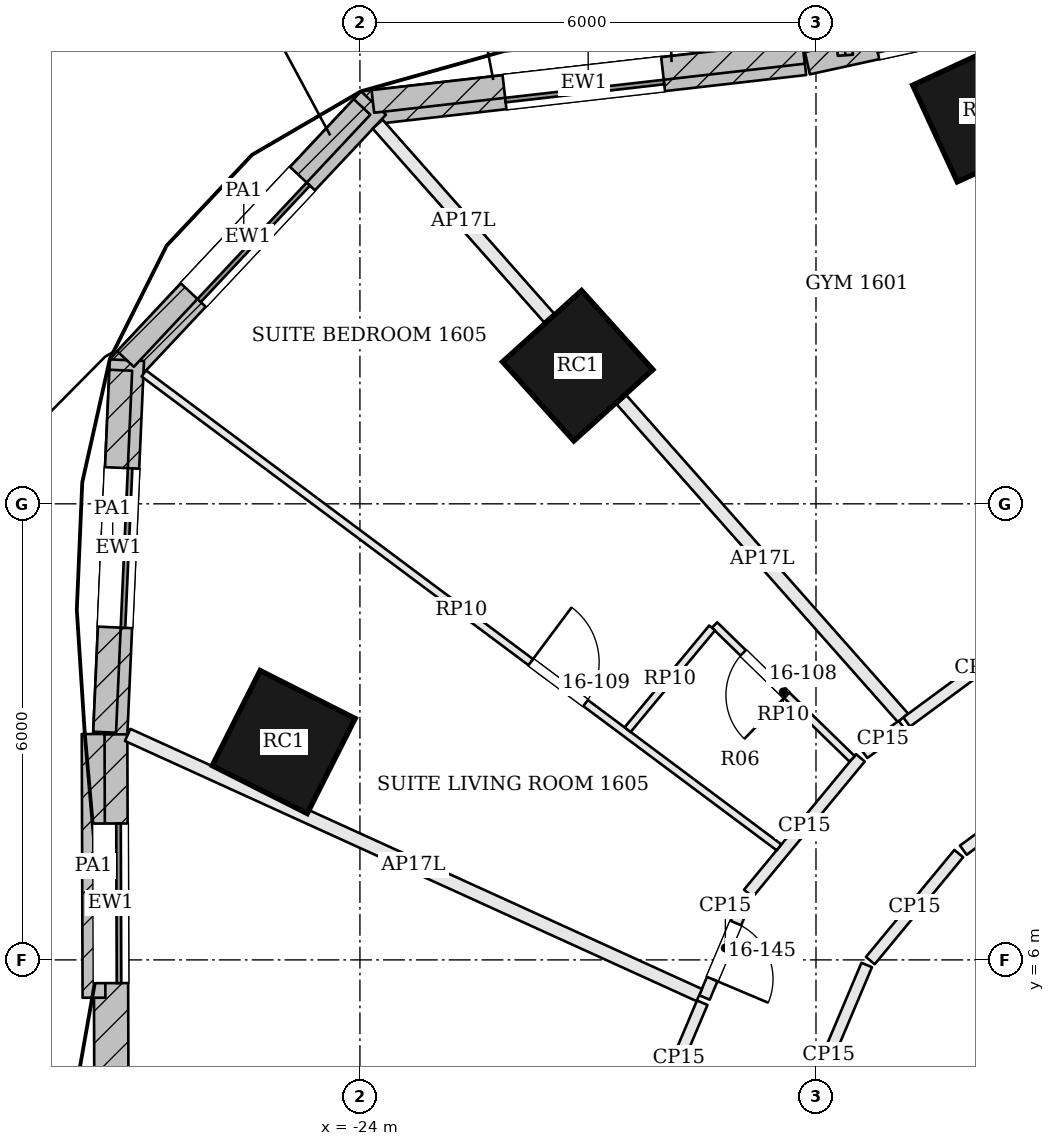
"""IFC4 building model, lengths in metres.
Left out: names, types, materials, properties, quantities, classifications, styles, units other than length and angle.
Written with IfcOpenShell. Run it as: python <this file> out.ifc"""

import sys

from ifc_helpers import new_model, si_unit, direction, frame, frame_2d, origin, origin_2d, place, context, subcontext, project, spatial, rectangle, extrude, element, fill, save


model = new_model("IFC4")
c1 = context("Model", 3, precision=1e-05, world=origin(), true_north=direction((0.0, 1.0)))
c2 = subcontext(c1, "Body", "Model", "MODEL_VIEW")
j1 = project(units=[si_unit("LENGTHUNIT", "METRE"), si_unit("PLANEANGLEUNIT", "RADIAN")], contexts=[c1])
p1 = place(None, origin())
s1 = spatial("IfcSite", under=j1, at=p1, CompositionType="ELEMENT")
p2 = place(p1, origin())
s2 = spatial("IfcBuilding", under=s1, at=p2, CompositionType="ELEMENT")
p3 = place(p2, frame((0.0, 0.0, 73.5)))
s3 = spatial("IfcBuildingStorey", under=s2, at=p3, CompositionType="ELEMENT", Elevation=73.5)
for number, where, z_axis, x_axis in (
    (1, (-15.799, 17.165, 0.0), (0.0, 0.0, 1.0), (-0.908, -0.419, 0.0)),
    (2, (-21.135, 13.817, 0.0), (0.0, 0.0, 1.0), (-0.743, -0.67, 0.0)),
    (3, (-25.003, 8.866, 0.0), (0.0, 0.0, 1.0), (-0.45, -0.893, 0.0)),
):
    element("IfcColumn", number, at=place(p3, frame(where, z_axis=z_axis, x_axis=x_axis)), inside=s3, PredefinedType="COLUMN", context=c2, shape_type="SweptSolid", body=[
        extrude(rectangle(XDim=1.4, YDim=1.4, at=origin_2d()), origin(), (0.0, 0.0, 1.0), 2.8),
    ])
p4 = place(p3, frame((-14.251, 18.718, 0.0), z_axis=(0.0, 0.0, 1.0), x_axis=(-0.976903627618, -0.213680374267, 0.0)))
e4 = element("IfcWall", 4, at=p4, inside=s3, PredefinedType="SOLIDWALL", context=c2, shape_type="SweptSolid", body=[
    extrude(rectangle(XDim=3.97, YDim=0.45, at=frame_2d((1.985, 0.0))), origin(), (0.0, 0.0, 1.0), 3.3),
])
p5 = place(p4, frame((0.935, 0.0, 0.9)))
e5 = element("IfcOpeningElement", 5, at=p5, cuts=e4, PredefinedType="OPENING", context=c2, shape_type="SweptSolid", body=[
    extrude(rectangle(XDim=2.1, YDim=1.8, at=frame_2d((1.05, 0.9))), frame((0.0, 0.235, 0.0), z_axis=(0.0, -1.0, 0.0), x_axis=(1.0, 0.0, 0.0)), (0.0, 0.0, 1.0), 0.47),
])
p6 = place(p3, frame((-18.154, 17.865, 0.0), z_axis=(0.0, 0.0, 1.0), x_axis=(-0.993572909097, -0.113193967633, 0.0)))
e6 = element("IfcWall", 6, at=p6, inside=s3, PredefinedType="SOLIDWALL", context=c2, shape_type="SweptSolid", body=[
    extrude(rectangle(XDim=5.839, YDim=0.45, at=frame_2d((2.919, 0.0))), origin(), (0.0, 0.0, 1.0), 3.3),
])
p7 = place(p6, frame((1.869, 0.0, 0.9)))
e7 = element("IfcOpeningElement", 7, at=p7, cuts=e6, PredefinedType="OPENING", context=c2, shape_type="SweptSolid", body=[
    extrude(rectangle(XDim=2.1, YDim=1.8, at=frame_2d((1.05, 0.9))), frame((0.0, 0.235, 0.0), z_axis=(0.0, -1.0, 0.0), x_axis=(1.0, 0.0, 0.0)), (0.0, 0.0, 1.0), 0.47),
])
p8 = place(p3, frame((-23.822, 17.273, 0.0), z_axis=(0.0, 0.0, 1.0), x_axis=(-0.684173167988, -0.729319598122, 0.0)))
e8 = element("IfcWall", 8, at=p8, inside=s3, PredefinedType="SOLIDWALL", context=c2, shape_type="SweptSolid", body=[
    extrude(rectangle(XDim=4.829, YDim=0.45, at=frame_2d((2.415, 0.0))), origin(), (0.0, 0.0, 1.0), 3.3),
])
p9 = place(p8, frame((1.365, 0.0, 0.9)))
e9 = element("IfcOpeningElement", 9, at=p9, cuts=e8, PredefinedType="OPENING", context=c2, shape_type="SweptSolid", body=[
    extrude(rectangle(XDim=2.1, YDim=1.8, at=frame_2d((1.05, 0.9))), frame((0.0, 0.235, 0.0), z_axis=(0.0, -1.0, 0.0), x_axis=(1.0, 0.0, 0.0)), (0.0, 0.0, 1.0), 0.47),
])
p10 = place(p3, frame((-27.065, 13.89, 0.0), z_axis=(0.0, 0.0, 1.0), x_axis=(-0.044544250924, -0.99900741224, 0.0)))
e10 = element("IfcWall", 10, at=p10, inside=s3, PredefinedType="SOLIDWALL", context=c2, shape_type="SweptSolid", body=[
    extrude(rectangle(XDim=4.938, YDim=0.45, at=frame_2d((2.469, 0.0))), origin(), (0.0, 0.0, 1.0), 3.3),
])
p11 = place(p10, frame((1.419, 0.0, 0.9)))
e11 = element("IfcOpeningElement", 11, at=p11, cuts=e10, PredefinedType="OPENING", context=c2, shape_type="SweptSolid", body=[
    extrude(rectangle(XDim=2.1, YDim=1.8, at=frame_2d((1.05, 0.9))), frame((0.0, 0.235, 0.0), z_axis=(0.0, -1.0, 0.0), x_axis=(1.0, 0.0, 0.0)), (0.0, 0.0, 1.0), 0.47),
])
p12 = place(p3, frame((-27.285, 8.967, 0.0), z_axis=(0.0, 0.0, 1.0), x_axis=(0.003185571797, -0.999994926053, 0.0)))
e12 = element("IfcWall", 12, at=p12, inside=s3, PredefinedType="SOLIDWALL", context=c2, shape_type="SweptSolid", body=[
    extrude(rectangle(XDim=4.445, YDim=0.45, at=frame_2d((2.223, 0.0))), origin(), (0.0, 0.0, 1.0), 3.3),
])
p13 = place(p12, frame((1.173, 0.0, 0.9)))
e13 = element("IfcOpeningElement", 13, at=p13, cuts=e12, PredefinedType="OPENING", context=c2, shape_type="SweptSolid", body=[
    extrude(rectangle(XDim=2.1, YDim=1.8, at=frame_2d((1.05, 0.9))), frame((0.0, 0.235, 0.0), z_axis=(0.0, -1.0, 0.0), x_axis=(1.0, 0.0, 0.0)), (0.0, 0.0, 1.0), 0.47),
])
p14 = place(p3, frame((-17.614, 17.901, 0.0), z_axis=(0.0, 0.0, 1.0), x_axis=(-0.069750000204, 0.997564502913, 0.0)))
e14 = element("IfcWall", 14, at=p14, inside=s3, PredefinedType="SOLIDWALL", context=c2, shape_type="SweptSolid", body=[
    extrude(rectangle(XDim=1.75, YDim=0.2, at=frame_2d((0.875, 0.0))), origin(), (0.0, 0.0, 1.0), 3.3),
])
p15 = place(p3, frame((-18.165, 17.939, 3.6), z_axis=(0.0, 0.0, 1.0), x_axis=(-0.99357552433, -0.113171009774, 0.0)))
e15 = element("IfcWall", 15, at=p15, inside=s3, PredefinedType="PARAPET", context=c2, shape_type="SweptSolid", body=[
    extrude(rectangle(XDim=5.702, YDim=0.3, at=frame_2d((2.851, 0.0))), origin(), (0.0, 0.0, 1.0), 1.1),
])
p16 = place(p3, frame((-23.972, 17.222, 3.6), z_axis=(0.0, 0.0, 1.0), x_axis=(-0.684173231326, -0.729319538705, 0.0)))
e16 = element("IfcWall", 16, at=p16, inside=s3, PredefinedType="PARAPET", context=c2, shape_type="SweptSolid", body=[
    extrude(rectangle(XDim=4.548, YDim=0.3, at=frame_2d((2.274, 0.0))), origin(), (0.0, 0.0, 1.0), 1.1),
])
p17 = place(p3, frame((-27.146, 13.757, 3.6), z_axis=(0.0, 0.0, 1.0), x_axis=(-0.044503972994, -0.999009207359, 0.0)))
e17 = element("IfcWall", 17, at=p17, inside=s3, PredefinedType="PARAPET", context=c2, shape_type="SweptSolid", body=[
    extrude(rectangle(XDim=4.767, YDim=0.3, at=frame_2d((2.384, 0.0))), origin(), (0.0, 0.0, 1.0), 1.1),
])
p18 = place(p3, frame((-27.51, 8.972, 3.6), z_axis=(0.0, 0.0, 1.0), x_axis=(0.003236912182, -0.999994761186, 0.0)))
e18 = element("IfcWall", 18, at=p18, inside=s3, PredefinedType="PARAPET", context=c2, shape_type="SweptSolid", body=[
    extrude(rectangle(XDim=3.469, YDim=0.3, at=frame_2d((1.735, 0.0))), origin(), (0.0, 0.0, 1.0), 1.1),
])
p19 = place(p3, frame((-14.861, 10.563, 0.0), z_axis=(0.0, 0.0, 1.0), x_axis=(-0.805253823387, -0.592930248781, 0.0)))
e19 = element("IfcWall", 19, at=p19, inside=s3, PredefinedType="PARTITIONING", context=c2, shape_type="SweptSolid", body=[
    extrude(rectangle(XDim=2.417, YDim=0.15, at=frame_2d((1.208, 0.0))), origin(), (0.0, 0.0, 1.0), 2.684),
])
p20 = place(p3, frame((-23.767, 16.995, 0.0), z_axis=(0.0, 0.0, 1.0), x_axis=(0.662714726813, -0.748871945572, 0.0)))
e20 = element("IfcWall", 20, at=p20, inside=s3, PredefinedType="PARTITIONING", context=c2, shape_type="SweptSolid", body=[
    extrude(rectangle(XDim=3.403, YDim=0.175, at=frame_2d((1.702, 0.0))), origin(), (0.0, 0.0, 1.0), 2.28),
])
p21 = place(p3, frame((-20.558, 13.368, 0.0), z_axis=(0.0, 0.0, 1.0), x_axis=(0.662734219401, -0.748854695141, 0.0)))
e21 = element("IfcWall", 21, at=p21, inside=s3, PredefinedType="PARTITIONING", context=c2, shape_type="SweptSolid", body=[
    extrude(rectangle(XDim=5.585, YDim=0.175, at=frame_2d((2.792, 0.0))), origin(), (0.0, 0.0, 1.0), 2.28),
])
p22 = place(p3, frame((-16.867, 9.085, 0.0), z_axis=(0.0, 0.0, 1.0), x_axis=(-0.805381102541, -0.592757353113, 0.0)))
e22 = element("IfcWall", 22, at=p22, inside=s3, PredefinedType="PARTITIONING", context=c2, shape_type="SweptSolid", body=[
    extrude(rectangle(XDim=0.622, YDim=0.15, at=frame_2d((0.311, 0.0))), origin(), (0.0, 0.0, 1.0), 2.684),
])
p23 = place(p3, frame((-17.416, 8.659, 0.0), z_axis=(0.0, 0.0, 1.0), x_axis=(-0.636865073139, -0.770975277564, 0.0)))
e23 = element("IfcWall", 23, at=p23, inside=s3, PredefinedType="PARTITIONING", context=c2, shape_type="SweptSolid", body=[
    extrude(rectangle(XDim=2.312, YDim=0.15, at=frame_2d((1.156, 0.0))), origin(), (0.0, 0.0, 1.0), 2.684),
])
p24 = place(p3, frame((-18.918, 6.807, 0.0), z_axis=(0.0, 0.0, 1.0), x_axis=(-0.389115481404, -0.921188982854, 0.0)))
e24 = element("IfcWall", 24, at=p24, inside=s3, PredefinedType="PARTITIONING", context=c2, shape_type="SweptSolid", body=[
    extrude(rectangle(XDim=1.412, YDim=0.15, at=frame_2d((0.706, 0.0))), origin(), (0.0, 0.0, 1.0), 2.684),
])
p25 = place(p24, frame((0.35, 0.0, 0.0)))
e25 = element("IfcOpeningElement", 25, at=p25, cuts=e24, PredefinedType="OPENING", context=c2, shape_type="SweptSolid", body=[
    extrude(rectangle(XDim=0.8, YDim=2.1, at=frame_2d((0.4, 1.05))), frame((0.0, 0.085, 0.0), z_axis=(0.0, -1.0, 0.0), x_axis=(1.0, 0.0, 0.0)), (0.0, 0.0, 1.0), 0.17),
])
p26 = place(p3, frame((-27.056, 8.96, 0.0), z_axis=(0.0, 0.0, 1.0), x_axis=(0.910158921773, -0.414259263164, 0.0)))
e26 = element("IfcWall", 26, at=p26, inside=s3, PredefinedType="PARTITIONING", context=c2, shape_type="SweptSolid", body=[
    extrude(rectangle(XDim=8.263, YDim=0.175, at=frame_2d((4.131, 0.0))), origin(), (0.0, 0.0, 1.0), 2.28),
])
p27 = place(p3, frame((-19.497, 5.437, 0.0), z_axis=(0.0, 0.0, 1.0), x_axis=(-0.389131954688, -0.921182024271, 0.0)))
e27 = element("IfcWall", 27, at=p27, inside=s3, PredefinedType="PARTITIONING", context=c2, shape_type="SweptSolid", body=[
    extrude(rectangle(XDim=1.583, YDim=0.15, at=frame_2d((0.792, 0.0))), origin(), (0.0, 0.0, 1.0), 2.684),
])
p28 = place(p3, frame((-18.33, 3.573, 0.0), z_axis=(0.0, 0.0, 1.0), x_axis=(0.389176861346, 0.921163053207, 0.0)))
e28 = element("IfcWall", 28, at=p28, inside=s3, PredefinedType="PARTITIONING", context=c2, shape_type="SweptSolid", body=[
    extrude(rectangle(XDim=2.563, YDim=0.15, at=frame_2d((1.281, 0.0))), origin(), (0.0, 0.0, 1.0), 2.684),
])
p29 = place(p3, frame((-17.285, 5.991, 0.0), z_axis=(0.0, 0.0, 1.0), x_axis=(0.636877992195, 0.770964605581, 0.0)))
e29 = element("IfcWall", 29, at=p29, inside=s3, PredefinedType="PARTITIONING", context=c2, shape_type="SweptSolid", body=[
    extrude(rectangle(XDim=1.826, YDim=0.15, at=frame_2d((0.913, 0.0))), origin(), (0.0, 0.0, 1.0), 2.684),
])
p30 = place(p3, frame((-16.062, 7.443, 0.0), z_axis=(0.0, 0.0, 1.0), x_axis=(0.805204624788, 0.5929970592, 0.0)))
e30 = element("IfcWall", 30, at=p30, inside=s3, PredefinedType="PARTITIONING", context=c2, shape_type="SweptSolid", body=[
    extrude(rectangle(XDim=1.567, YDim=0.15, at=frame_2d((0.783, 0.0))), origin(), (0.0, 0.0, 1.0), 2.684),
])
p31 = place(p3, frame((-26.844, 13.716, 0.0), z_axis=(0.0, 0.0, 1.0), x_axis=(0.801523054034, -0.597963873367, 0.0)))
e31 = element("IfcWall", 31, at=p31, inside=s3, PredefinedType="PARTITIONING", context=c2, shape_type="SweptSolid", body=[
    extrude(rectangle(XDim=10.427, YDim=0.1, at=frame_2d((5.214, 0.0))), origin(), (0.0, 0.0, 1.0), 2.784),
])
p32 = place(p31, frame((6.352, 0.0, 0.0)))
e32 = element("IfcOpeningElement", 32, at=p32, cuts=e31, PredefinedType="OPENING", context=c2, shape_type="SweptSolid", body=[
    extrude(rectangle(XDim=0.9, YDim=2.4, at=frame_2d((0.45, 1.2))), frame((0.0, 0.06, 0.0), z_axis=(0.0, -1.0, 0.0), x_axis=(1.0, 0.0, 0.0)), (0.0, 0.0, 1.0), 0.12),
])
p33 = place(p3, frame((-17.525, 8.644, 0.0), z_axis=(0.0, 0.0, 1.0), x_axis=(-0.716661927844, 0.697420734692, 0.0)))
e33 = element("IfcWall", 33, at=p33, inside=s3, PredefinedType="PARTITIONING", context=c2, shape_type="SweptSolid", body=[
    extrude(rectangle(XDim=2.525, YDim=0.1, at=frame_2d((1.262, 0.0))), origin(), (0.0, 0.0, 1.0), 2.784),
])
p34 = place(p33, frame((1.2, 0.0, 0.0)))
e34 = element("IfcOpeningElement", 34, at=p34, cuts=e33, PredefinedType="OPENING", context=c2, shape_type="SweptSolid", body=[
    extrude(rectangle(XDim=0.8, YDim=2.1, at=frame_2d((0.4, 1.05))), frame((0.0, 0.06, 0.0), z_axis=(0.0, -1.0, 0.0), x_axis=(1.0, 0.0, 0.0)), (0.0, 0.0, 1.0), 0.12),
])
p35 = place(p3, frame((-19.366, 10.367, 0.0), z_axis=(0.0, 0.0, 1.0), x_axis=(-0.63913466048, -0.76909484836, 0.0)))
e35 = element("IfcWall", 35, at=p35, inside=s3, PredefinedType="PARTITIONING", context=c2, shape_type="SweptSolid", body=[
    extrude(rectangle(XDim=1.74, YDim=0.1, at=frame_2d((0.87, 0.0))), origin(), (0.0, 0.0, 1.0), 2.784),
])
p36 = place(p5, origin())
e36 = element("IfcWindow", 36, at=p36, inside=s3, PartitioningType="SINGLE_PANEL", PredefinedType="WINDOW", context=c2, shape_type="SweptSolid", body=[
    extrude(rectangle(XDim=2.1, YDim=1.8, at=frame_2d((1.05, 0.9))), frame((0.0, 0.135, 0.0), z_axis=(0.0, -1.0, 0.0), x_axis=(1.0, 0.0, 0.0)), (0.0, 0.0, 1.0), 0.06),
])
fill(e5, e36)
p37 = place(p7, origin())
e37 = element("IfcWindow", 37, at=p37, inside=s3, PartitioningType="SINGLE_PANEL", PredefinedType="WINDOW", context=c2, shape_type="SweptSolid", body=[
    extrude(rectangle(XDim=2.1, YDim=1.8, at=frame_2d((1.05, 0.9))), frame((0.0, 0.135, 0.0), z_axis=(0.0, -1.0, 0.0), x_axis=(1.0, 0.0, 0.0)), (0.0, 0.0, 1.0), 0.06),
])
fill(e7, e37)
p38 = place(p9, origin())
e38 = element("IfcWindow", 38, at=p38, inside=s3, PartitioningType="SINGLE_PANEL", PredefinedType="WINDOW", context=c2, shape_type="SweptSolid", body=[
    extrude(rectangle(XDim=2.1, YDim=1.8, at=frame_2d((1.05, 0.9))), frame((0.0, 0.135, 0.0), z_axis=(0.0, -1.0, 0.0), x_axis=(1.0, 0.0, 0.0)), (0.0, 0.0, 1.0), 0.06),
])
fill(e9, e38)
p39 = place(p11, origin())
e39 = element("IfcWindow", 39, at=p39, inside=s3, PartitioningType="SINGLE_PANEL", PredefinedType="WINDOW", context=c2, shape_type="SweptSolid", body=[
    extrude(rectangle(XDim=2.1, YDim=1.8, at=frame_2d((1.05, 0.9))), frame((0.0, 0.135, 0.0), z_axis=(0.0, -1.0, 0.0), x_axis=(1.0, 0.0, 0.0)), (0.0, 0.0, 1.0), 0.06),
])
fill(e11, e39)
p40 = place(p13, origin())
e40 = element("IfcWindow", 40, at=p40, inside=s3, PartitioningType="SINGLE_PANEL", PredefinedType="WINDOW", context=c2, shape_type="SweptSolid", body=[
    extrude(rectangle(XDim=2.1, YDim=1.8, at=frame_2d((1.05, 0.9))), frame((0.0, 0.135, 0.0), z_axis=(0.0, -1.0, 0.0), x_axis=(1.0, 0.0, 0.0)), (0.0, 0.0, 1.0), 0.06),
])
fill(e13, e40)
p41 = place(p34, origin())
e41 = element("IfcDoor", 41, at=p41, inside=s3, OperationType="SINGLE_SWING_LEFT", PredefinedType="DOOR", context=c2, shape_type="SweptSolid", body=[
    extrude(rectangle(XDim=0.8, YDim=2.1, at=frame_2d((0.4, 1.05))), frame((0.0, 0.025, 0.0), z_axis=(0.0, -1.0, 0.0), x_axis=(1.0, 0.0, 0.0)), (0.0, 0.0, 1.0), 0.05),
])
fill(e34, e41)
p42 = place(p32, origin())
e42 = element("IfcDoor", 42, at=p42, inside=s3, OperationType="SINGLE_SWING_LEFT", PredefinedType="DOOR", context=c2, shape_type="SweptSolid", body=[
    extrude(rectangle(XDim=0.9, YDim=2.4, at=frame_2d((0.45, 1.2))), frame((0.0, 0.025, 0.0), z_axis=(0.0, -1.0, 0.0), x_axis=(1.0, 0.0, 0.0)), (0.0, 0.0, 1.0), 0.05),
])
fill(e32, e42)
p43 = place(p25, origin())
e43 = element("IfcDoor", 43, at=p43, inside=s3, OperationType="SINGLE_SWING_RIGHT", PredefinedType="DOOR", context=c2, shape_type="SweptSolid", body=[
    extrude(rectangle(XDim=0.8, YDim=2.1, at=frame_2d((0.4, 1.05))), frame((0.0, 0.025, 0.0), z_axis=(0.0, -1.0, 0.0), x_axis=(1.0, 0.0, 0.0)), (0.0, 0.0, 1.0), 0.05),
])
fill(e25, e43)
save(model, sys.argv[1])
